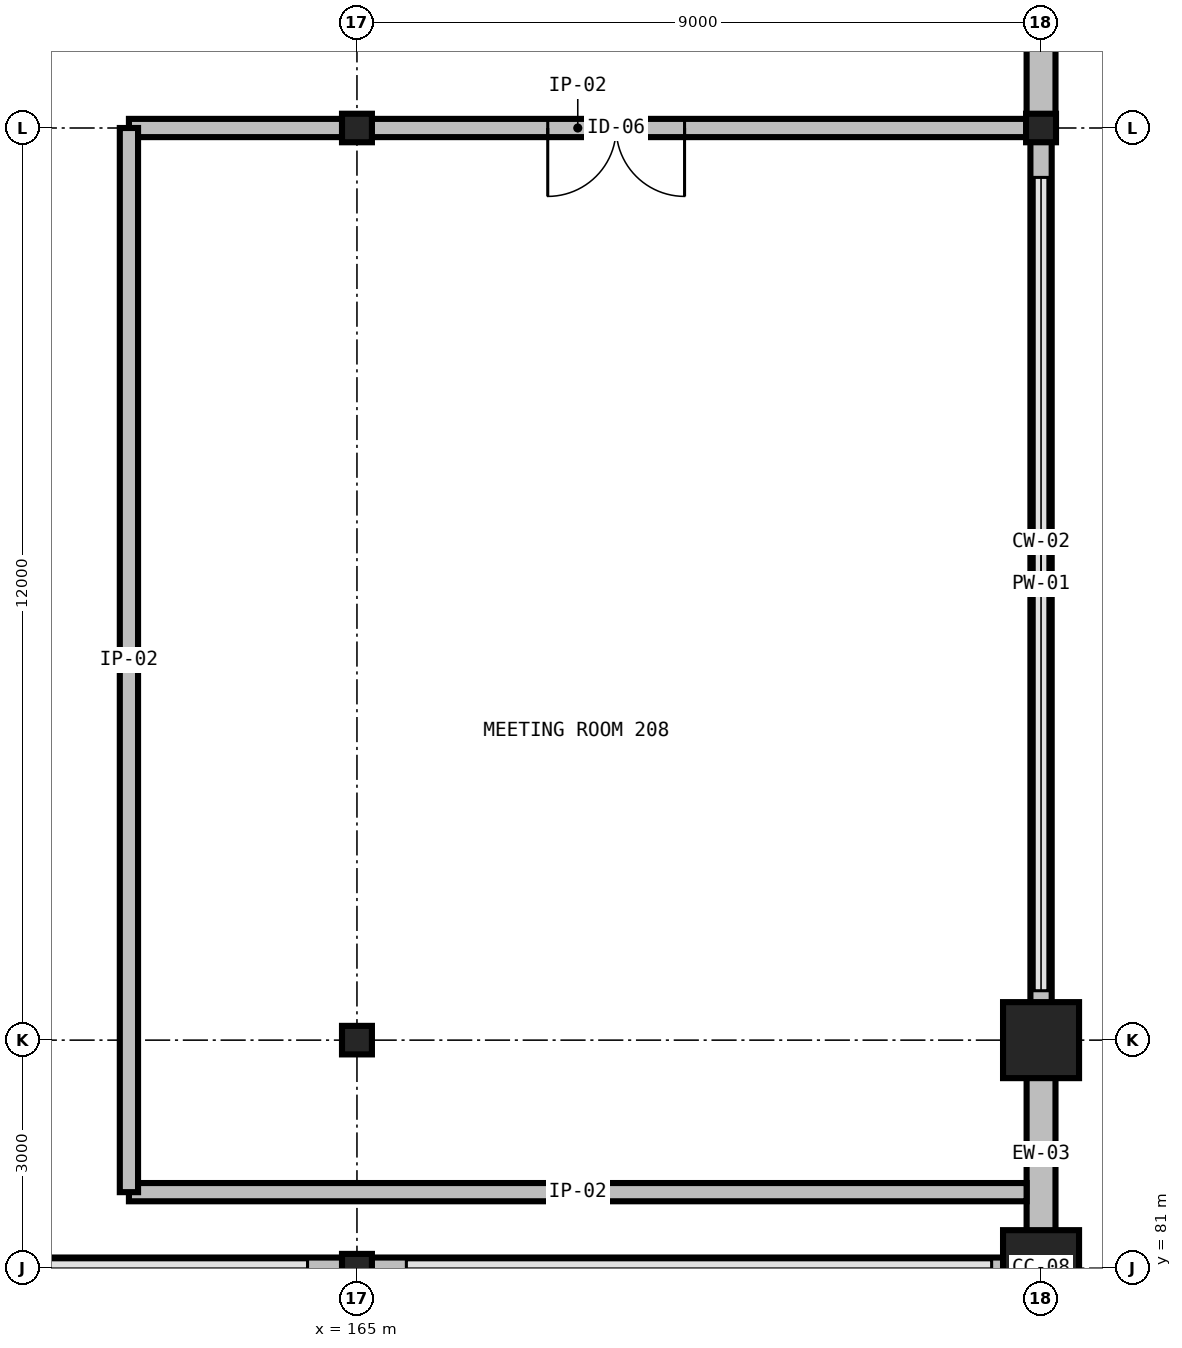
"""IFC4 building model, lengths in metres.
Left out: names, types, materials, properties, quantities, classifications, styles, units other than length and angle.
Written with IfcOpenShell. Run it as: python <this file> out.ifc"""

import sys

from ifc_helpers import new_model, si_unit, direction, frame, frame_2d, origin, origin_2d, place, context, subcontext, project, spatial, rectangle, circle, i_section, extrude, element, fill, save


model = new_model("IFC4")
c1 = context("Model", 3, precision=1e-05, world=origin(), true_north=direction((0.0, 1.0)))
c2 = subcontext(c1, "Body", "Model", "MODEL_VIEW")
j1 = project(units=[si_unit("LENGTHUNIT", "METRE"), si_unit("PLANEANGLEUNIT", "RADIAN")], contexts=[c1])
p1 = place(None, origin())
s1 = spatial("IfcSite", under=j1, at=p1, CompositionType="ELEMENT")
p2 = place(p1, origin())
s2 = spatial("IfcBuilding", under=s1, at=p2, CompositionType="ELEMENT")
p3 = place(p2, frame((0.0, 0.0, 12.0)))
s3 = spatial("IfcBuildingStorey", under=s2, at=p3, CompositionType="ELEMENT", Elevation=12.0)
for number, where, z_axis, x_axis in (
    (1, (165.0, 81.0, 0.0), (0.0, 0.0, 1.0), (1.0, 0.0, 0.0)),
    (2, (165.0, 84.0, 0.0), (0.0, 0.0, 1.0), (1.0, 0.0, 0.0)),
    (3, (165.0, 96.0, 0.0), (0.0, 0.0, 1.0), (1.0, 0.0, 0.0)),
):
    element("IfcColumn", number, at=place(p3, frame(where, z_axis=z_axis, x_axis=x_axis)), inside=s3, PredefinedType="COLUMN", context=c2, shape_type="SweptSolid", body=[
        extrude(i_section(OverallWidth=0.394, OverallDepth=0.375, WebThickness=0.017, FlangeThickness=0.028, FilletRadius=0.031, at=origin_2d()), origin(), (0.0, 0.0, 1.0), 6.0),
    ])
for number, where, z_axis, x_axis in (
    (4, (174.0, 81.0, 0.0), (0.0, 0.0, 1.0), (1.0, 0.0, 0.0)),
    (5, (174.0, 84.0, 0.0), (0.0, 0.0, 1.0), (1.0, 0.0, 0.0)),
):
    element("IfcColumn", number, at=place(p3, frame(where, z_axis=z_axis, x_axis=x_axis)), inside=s3, PredefinedType="COLUMN", context=c2, shape_type="SweptSolid", body=[
        extrude(circle(Radius=0.5, at=origin_2d()), origin(), (0.0, 0.0, 1.0), 6.0),
    ])
p4 = place(p3, frame((174.0, 96.0, 0.0), z_axis=(0.0, 0.0, 1.0), x_axis=(1.0, 0.0, 0.0)))
e6 = element("IfcColumn", 6, at=p4, inside=s3, PredefinedType="COLUMN", context=c2, shape_type="SweptSolid", body=[
    extrude(i_section(OverallWidth=0.394, OverallDepth=0.375, WebThickness=0.017, FlangeThickness=0.028, FilletRadius=0.031, at=origin_2d()), origin(), (0.0, 0.0, 1.0), 6.0),
])
p5 = place(p3, frame((174.0, 81.0, 0.0), z_axis=(0.0, 0.0, 1.0), x_axis=(0.0, 1.0, 0.0)))
e7 = element("IfcWall", 7, at=p5, inside=s3, PredefinedType="STANDARD", context=c2, shape_type="SweptSolid", body=[
    extrude(rectangle(XDim=3.0, YDim=0.38, at=frame_2d((1.5, 0.0))), origin(), (0.0, 0.0, 1.0), 5.239),
])
p6 = place(p3, frame((174.0, 84.0, 0.0), z_axis=(0.0, 0.0, 1.0), x_axis=(0.0, 1.0, 0.0)))
e8 = element("IfcWall", 8, at=p6, inside=s3, PredefinedType="PARAPET", context=c2, shape_type="SweptSolid", body=[
    extrude(rectangle(XDim=12.0, YDim=0.28, at=frame_2d((6.0, 0.0))), origin(), (0.0, 0.0, 1.0), 0.2),
])
p7 = place(p3, frame((174.0, 96.0, 0.0), z_axis=(0.0, 0.0, 1.0), x_axis=(0.0, 1.0, 0.0)))
e9 = element("IfcWall", 9, at=p7, inside=s3, PredefinedType="STANDARD", context=c2, shape_type="SweptSolid", body=[
    extrude(rectangle(XDim=9.0, YDim=0.38, at=frame_2d((4.5, 0.0))), origin(), (0.0, 0.0, 1.0), 5.239),
])
for number, where, z_axis, x_axis in (
    (10, (156.0, 81.0, 0.0), (0.0, 0.0, 1.0), (1.0, 0.0, 0.0)),
    (11, (165.0, 81.0, 0.0), (0.0, 0.0, 1.0), (1.0, 0.0, 0.0)),
):
    element("IfcWall", number, at=place(p3, frame(where, z_axis=z_axis, x_axis=x_axis)), inside=s3, PredefinedType="PARAPET", context=c2, shape_type="SweptSolid", body=[
        extrude(rectangle(XDim=9.0, YDim=0.28, at=frame_2d((4.5, 0.0))), origin(), (0.0, 0.0, 1.0), 0.2),
    ])
p8 = place(p3, frame((162.0, 82.0, 0.0), z_axis=(0.0, 0.0, 1.0), x_axis=(1.0, 0.0, 0.0)))
e12 = element("IfcWall", 12, at=p8, inside=s3, PredefinedType="PARTITIONING", context=c2, shape_type="SweptSolid", body=[
    extrude(rectangle(XDim=11.81, YDim=0.24, at=frame_2d((5.905, 0.0))), origin(), (0.0, 0.0, 1.0), 5.65),
])
p9 = place(p3, frame((173.81, 96.0, 0.0), z_axis=(0.0, 0.0, 1.0), x_axis=(-1.0, 0.0, 0.0)))
e13 = element("IfcWall", 13, at=p9, inside=s3, PredefinedType="PARTITIONING", context=c2, shape_type="SweptSolid", body=[
    extrude(rectangle(XDim=11.81, YDim=0.24, at=frame_2d((5.905, 0.0))), origin(), (0.0, 0.0, 1.0), 4.957),
])
p10 = place(p9, frame((4.5, 0.0, 0.0)))
e14 = element("IfcOpeningElement", 14, at=p10, cuts=e13, PredefinedType="OPENING", context=c2, shape_type="SweptSolid", body=[
    extrude(rectangle(XDim=1.8, YDim=2.3, at=frame_2d((0.9, 1.15))), frame((0.0, 0.135, 0.0), z_axis=(0.0, -1.0, 0.0), x_axis=(1.0, 0.0, 0.0)), (0.0, 0.0, 1.0), 0.27),
])
p11 = place(p3, frame((162.0, 96.0, 0.0), z_axis=(0.0, 0.0, 1.0), x_axis=(0.0, -1.0, 0.0)))
e15 = element("IfcWall", 15, at=p11, inside=s3, PredefinedType="PARTITIONING", context=c2, shape_type="SweptSolid", body=[
    extrude(rectangle(XDim=14.0, YDim=0.24, at=frame_2d((7.0, 0.0))), origin(), (0.0, 0.0, 1.0), 5.65),
])
p12 = place(p10, origin())
e16 = element("IfcDoor", 16, at=p12, inside=s3, OperationType="DOUBLE_DOOR_SINGLE_SWING", PredefinedType="DOOR", context=c2, shape_type="SweptSolid", body=[
    extrude(rectangle(XDim=1.8, YDim=2.3, at=frame_2d((0.9, 1.15))), frame((0.0, 0.025, 0.0), z_axis=(0.0, -1.0, 0.0), x_axis=(1.0, 0.0, 0.0)), (0.0, 0.0, 1.0), 0.05),
])
fill(e14, e16)
save(model, sys.argv[1])
